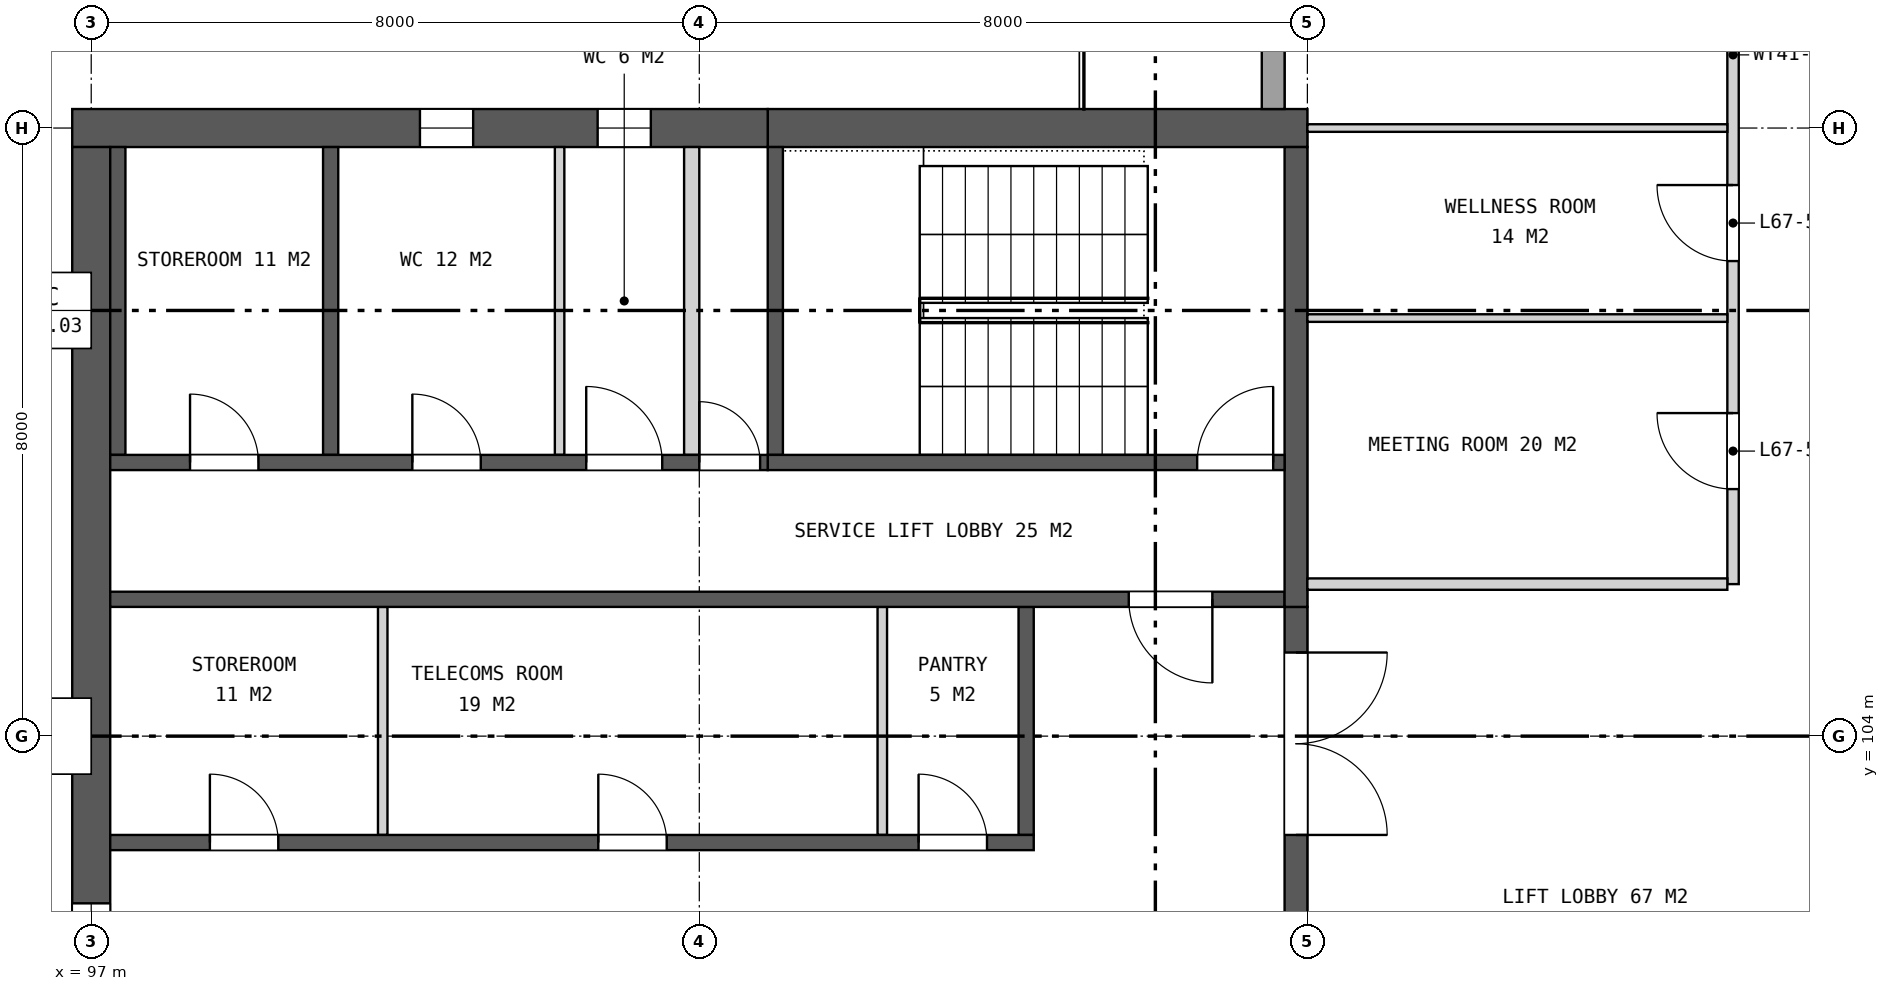
"""IFC4 building model, lengths in metres.
Left out: names, types, materials, properties, quantities, classifications, styles, units other than length and angle.
Written with IfcOpenShell. Run it as: python <this file> out.ifc"""

import sys

from ifc_helpers import new_model, si_unit, direction, frame, frame_2d, origin, place, context, subcontext, project, spatial, rectangle, extrude, element, fill, save


model = new_model("IFC4")
c1 = context("Model", 3, precision=1e-05, world=origin(), true_north=direction((0.0, 1.0)))
c2 = subcontext(c1, "Body", "Model", "MODEL_VIEW")
j1 = project(units=[si_unit("LENGTHUNIT", "METRE"), si_unit("PLANEANGLEUNIT", "RADIAN")], contexts=[c1])
p1 = place(None, origin())
s1 = spatial("IfcSite", under=j1, at=p1, CompositionType="ELEMENT")
p2 = place(p1, origin())
s2 = spatial("IfcBuilding", under=s1, at=p2, CompositionType="ELEMENT")
p3 = place(p2, frame((0.0, 0.0, 311.3)))
s3 = spatial("IfcBuildingStorey", under=s2, at=p3, CompositionType="ELEMENT", Elevation=311.3)
p4 = place(p3, frame((113.0, 112.0, 0.0), z_axis=(0.0, 0.0, 1.0), x_axis=(-1.0, 0.0, 0.0)))
e1 = element("IfcWall", 1, at=p4, inside=s3, PredefinedType="SHEAR", context=c2, shape_type="SweptSolid", body=[
    extrude(rectangle(XDim=7.1, YDim=0.5, at=frame_2d((3.55, 0.0))), origin(), (0.0, 0.0, 1.0), 4.2),
])
p5 = place(p3, frame((105.9, 112.0, 0.0), z_axis=(0.0, 0.0, 1.0), x_axis=(-1.0, 0.0, 0.0)))
e2 = element("IfcWall", 2, at=p5, inside=s3, PredefinedType="SHEAR", context=c2, shape_type="SweptSolid", body=[
    extrude(rectangle(XDim=9.15, YDim=0.5, at=frame_2d((4.575, 0.0))), origin(), (0.0, 0.0, 1.0), 4.2),
])
p6 = place(p5, frame((1.538, 0.0, 1.5)))
e3 = element("IfcOpeningElement", 3, at=p6, cuts=e2, PredefinedType="OPENING", context=c2, shape_type="SweptSolid", body=[
    extrude(rectangle(XDim=0.7, YDim=0.9, at=frame_2d((0.35, 0.45))), frame((0.0, 0.26, 0.0), z_axis=(0.0, -1.0, 0.0), x_axis=(1.0, 0.0, 0.0)), (0.0, 0.0, 1.0), 0.52),
])
p7 = place(p5, frame((3.875, 0.0, 1.5)))
e4 = element("IfcOpeningElement", 4, at=p7, cuts=e2, PredefinedType="OPENING", context=c2, shape_type="SweptSolid", body=[
    extrude(rectangle(XDim=0.7, YDim=0.9, at=frame_2d((0.35, 0.45))), frame((0.0, 0.26, 0.0), z_axis=(0.0, -1.0, 0.0), x_axis=(1.0, 0.0, 0.0)), (0.0, 0.0, 1.0), 0.52),
])
p8 = place(p3, frame((97.0, 111.75, 0.0), z_axis=(0.0, 0.0, 1.0), x_axis=(0.0, -1.0, 0.0)))
e5 = element("IfcWall", 5, at=p8, inside=s3, PredefinedType="SHEAR", context=c2, shape_type="SweptSolid", body=[
    extrude(rectangle(XDim=23.5, YDim=0.5, at=frame_2d((11.75, 0.0))), origin(), (0.0, 0.0, 1.0), 4.2),
])
p9 = place(p8, frame((9.95, 0.0, 0.15)))
e6 = element("IfcOpeningElement", 6, at=p9, cuts=e5, PredefinedType="OPENING", context=c2, shape_type="SweptSolid", body=[
    extrude(rectangle(XDim=3.6, YDim=3.0, at=frame_2d((1.8, 1.5))), frame((0.0, 0.26, 0.0), z_axis=(0.0, -1.0, 0.0), x_axis=(1.0, 0.0, 0.0)), (0.0, 0.0, 1.0), 0.52),
])
p10 = place(p3, frame((112.85, 105.7, 0.0), z_axis=(0.0, 0.0, 1.0), x_axis=(0.0, -1.0, 0.0)))
e7 = element("IfcWall", 7, at=p10, inside=s3, PredefinedType="SHEAR", context=c2, shape_type="SweptSolid", body=[
    extrude(rectangle(XDim=11.4, YDim=0.3, at=frame_2d((5.7, 0.0))), origin(), (0.0, 0.0, 1.0), 4.2),
])
p11 = place(p10, frame((0.6, 0.0, 0.0)))
e8 = element("IfcOpeningElement", 8, at=p11, cuts=e7, PredefinedType="OPENING", context=c2, shape_type="SweptSolid", body=[
    extrude(rectangle(XDim=2.4, YDim=2.4, at=frame_2d((1.2, 1.2))), frame((0.0, 0.16, 0.0), z_axis=(0.0, -1.0, 0.0), x_axis=(1.0, 0.0, 0.0)), (0.0, 0.0, 1.0), 0.32),
])
p12 = place(p10, frame((4.5, 0.0, 0.0)))
e9 = element("IfcOpeningElement", 9, at=p12, cuts=e7, PredefinedType="OPENING", context=c2, shape_type="SweptSolid", body=[
    extrude(rectangle(XDim=2.4, YDim=2.4, at=frame_2d((1.2, 1.2))), frame((0.0, 0.16, 0.0), z_axis=(0.0, -1.0, 0.0), x_axis=(1.0, 0.0, 0.0)), (0.0, 0.0, 1.0), 0.32),
])
p13 = place(p10, frame((8.4, 0.0, 0.0)))
e10 = element("IfcOpeningElement", 10, at=p13, cuts=e7, PredefinedType="OPENING", context=c2, shape_type="SweptSolid", body=[
    extrude(rectangle(XDim=2.4, YDim=2.4, at=frame_2d((1.2, 1.2))), frame((0.0, 0.16, 0.0), z_axis=(0.0, -1.0, 0.0), x_axis=(1.0, 0.0, 0.0)), (0.0, 0.0, 1.0), 0.32),
])
p14 = place(p3, frame((109.3, 105.7, 0.0), z_axis=(0.0, 0.0, 1.0), x_axis=(0.0, -1.0, 0.0)))
e11 = element("IfcWall", 11, at=p14, inside=s3, PredefinedType="SHEAR", context=c2, shape_type="SweptSolid", body=[
    extrude(rectangle(XDim=3.0, YDim=0.2, at=frame_2d((1.5, 0.0))), origin(), (0.0, 0.0, 1.0), 4.2),
])
for number, where, z_axis, x_axis in (
    (12, (107.407, 105.7, 0.0), (0.0, 0.0, 1.0), (0.0, -1.0, 0.0)),
    (13, (100.835, 105.7, 0.0), (0.0, 0.0, 1.0), (0.0, -1.0, 0.0)),
):
    element("IfcWall", number, at=place(p3, frame(where, z_axis=z_axis, x_axis=x_axis)), inside=s3, PredefinedType="PARTITIONING", context=c2, shape_type="SweptSolid", body=[
        extrude(rectangle(XDim=3.0, YDim=0.125, at=frame_2d((1.5, 0.0))), origin(), (0.0, 0.0, 1.0), 4.2),
    ])
p15 = place(p3, frame((109.4, 102.6, 0.0), z_axis=(0.0, 0.0, 1.0), x_axis=(-1.0, 0.0, 0.0)))
e14 = element("IfcWall", 14, at=p15, inside=s3, PredefinedType="SHEAR", context=c2, shape_type="SweptSolid", body=[
    extrude(rectangle(XDim=12.15, YDim=0.2, at=frame_2d((6.075, 0.0))), origin(), (0.0, 0.0, 1.0), 4.2),
])
p16 = place(p15, frame((0.615, 0.0, 0.0)))
e15 = element("IfcOpeningElement", 15, at=p16, cuts=e14, PredefinedType="OPENING", context=c2, shape_type="SweptSolid", body=[
    extrude(rectangle(XDim=0.9, YDim=2.1, at=frame_2d((0.45, 1.05))), frame((0.0, 0.11, 0.0), z_axis=(0.0, -1.0, 0.0), x_axis=(1.0, 0.0, 0.0)), (0.0, 0.0, 1.0), 0.22),
])
p17 = place(p15, frame((4.829, 0.0, 0.0)))
e16 = element("IfcOpeningElement", 16, at=p17, cuts=e14, PredefinedType="OPENING", context=c2, shape_type="SweptSolid", body=[
    extrude(rectangle(XDim=0.9, YDim=2.1, at=frame_2d((0.45, 1.05))), frame((0.0, 0.11, 0.0), z_axis=(0.0, -1.0, 0.0), x_axis=(1.0, 0.0, 0.0)), (0.0, 0.0, 1.0), 0.22),
])
p18 = place(p15, frame((9.939, 0.0, 0.0)))
e17 = element("IfcOpeningElement", 17, at=p18, cuts=e14, PredefinedType="OPENING", context=c2, shape_type="SweptSolid", body=[
    extrude(rectangle(XDim=0.9, YDim=2.1, at=frame_2d((0.45, 1.05))), frame((0.0, 0.11, 0.0), z_axis=(0.0, -1.0, 0.0), x_axis=(1.0, 0.0, 0.0)), (0.0, 0.0, 1.0), 0.22),
])
p19 = place(p3, frame((112.7, 105.8, 0.0), z_axis=(0.0, 0.0, 1.0), x_axis=(-1.0, 0.0, 0.0)))
e18 = element("IfcWall", 18, at=p19, inside=s3, PredefinedType="SHEAR", context=c2, shape_type="SweptSolid", body=[
    extrude(rectangle(XDim=15.45, YDim=0.2, at=frame_2d((7.725, 0.0))), origin(), (0.0, 0.0, 1.0), 4.2),
])
p20 = place(p19, frame((0.95, 0.0, 0.0)))
e19 = element("IfcOpeningElement", 19, at=p20, cuts=e18, PredefinedType="OPENING", context=c2, shape_type="SweptSolid", body=[
    extrude(rectangle(XDim=1.1, YDim=2.1, at=frame_2d((0.55, 1.05))), frame((0.0, 0.11, 0.0), z_axis=(0.0, -1.0, 0.0), x_axis=(1.0, 0.0, 0.0)), (0.0, 0.0, 1.0), 0.22),
])
p21 = place(p3, frame((112.85, 111.75, 0.0), z_axis=(0.0, 0.0, 1.0), x_axis=(0.0, -1.0, 0.0)))
e20 = element("IfcWall", 20, at=p21, inside=s3, PredefinedType="SHEAR", context=c2, shape_type="SweptSolid", body=[
    extrude(rectangle(XDim=6.05, YDim=0.3, at=frame_2d((3.025, 0.0))), origin(), (0.0, 0.0, 1.0), 4.2),
])
for number, where, z_axis, x_axis in (
    (21, (106.0, 111.75, 0.0), (0.0, 0.0, 1.0), (0.0, -1.0, 0.0)),
    (22, (100.15, 111.75, 0.0), (0.0, 0.0, 1.0), (0.0, -1.0, 0.0)),
    (23, (97.35, 111.75, 0.0), (0.0, 0.0, 1.0), (0.0, -1.0, 0.0)),
):
    element("IfcWall", number, at=place(p3, frame(where, z_axis=z_axis, x_axis=x_axis)), inside=s3, PredefinedType="SHEAR", context=c2, shape_type="SweptSolid", body=[
        extrude(rectangle(XDim=4.05, YDim=0.2, at=frame_2d((2.025, 0.0))), origin(), (0.0, 0.0, 1.0), 4.2),
    ])
p22 = place(p3, frame((104.9, 111.75, 0.0), z_axis=(0.0, 0.0, 1.0), x_axis=(0.0, -1.0, 0.0)))
e24 = element("IfcWall", 24, at=p22, inside=s3, PredefinedType="PARTITIONING", context=c2, shape_type="SweptSolid", body=[
    extrude(rectangle(XDim=4.05, YDim=0.2, at=frame_2d((2.025, 0.0))), origin(), (0.0, 0.0, 1.0), 4.2),
])
p23 = place(p3, frame((103.162, 111.75, 0.0), z_axis=(0.0, 0.0, 1.0), x_axis=(0.0, -1.0, 0.0)))
e25 = element("IfcWall", 25, at=p23, inside=s3, PredefinedType="PARTITIONING", context=c2, shape_type="SweptSolid", body=[
    extrude(rectangle(XDim=4.05, YDim=0.125, at=frame_2d((2.025, 0.0))), origin(), (0.0, 0.0, 1.0), 4.2),
])
p24 = place(p3, frame((112.7, 107.6, 0.0), z_axis=(0.0, 0.0, 1.0), x_axis=(-1.0, 0.0, 0.0)))
e26 = element("IfcWall", 26, at=p24, inside=s3, PredefinedType="SHEAR", context=c2, shape_type="SweptSolid", body=[
    extrude(rectangle(XDim=6.8, YDim=0.2, at=frame_2d((3.4, 0.0))), origin(), (0.0, 0.0, 1.0), 4.2),
])
p25 = place(p24, frame((0.15, 0.0, 0.0)))
e27 = element("IfcOpeningElement", 27, at=p25, cuts=e26, PredefinedType="OPENING", context=c2, shape_type="SweptSolid", body=[
    extrude(rectangle(XDim=1.0, YDim=2.1, at=frame_2d((0.5, 1.05))), frame((0.0, 0.11, 0.0), z_axis=(0.0, -1.0, 0.0), x_axis=(1.0, 0.0, 0.0)), (0.0, 0.0, 1.0), 0.22),
])
p26 = place(p3, frame((105.9, 107.6, 0.0), z_axis=(0.0, 0.0, 1.0), x_axis=(-1.0, 0.0, 0.0)))
e28 = element("IfcWall", 28, at=p26, inside=s3, PredefinedType="SHEAR", context=c2, shape_type="SweptSolid", body=[
    extrude(rectangle(XDim=8.65, YDim=0.2, at=frame_2d((4.325, 0.0))), origin(), (0.0, 0.0, 1.0), 4.2),
])
p27 = place(p26, frame((0.1, 0.0, 0.0)))
e29 = element("IfcOpeningElement", 29, at=p27, cuts=e28, PredefinedType="OPENING", context=c2, shape_type="SweptSolid", body=[
    extrude(rectangle(XDim=0.8, YDim=2.1, at=frame_2d((0.4, 1.05))), frame((0.0, 0.11, 0.0), z_axis=(0.0, -1.0, 0.0), x_axis=(1.0, 0.0, 0.0)), (0.0, 0.0, 1.0), 0.22),
])
p28 = place(p26, frame((1.388, 0.0, 0.0)))
e30 = element("IfcOpeningElement", 30, at=p28, cuts=e28, PredefinedType="OPENING", context=c2, shape_type="SweptSolid", body=[
    extrude(rectangle(XDim=1.0, YDim=2.1, at=frame_2d((0.5, 1.05))), frame((0.0, 0.11, 0.0), z_axis=(0.0, -1.0, 0.0), x_axis=(1.0, 0.0, 0.0)), (0.0, 0.0, 1.0), 0.22),
])
p29 = place(p26, frame((3.775, 0.0, 0.0)))
e31 = element("IfcOpeningElement", 31, at=p29, cuts=e28, PredefinedType="OPENING", context=c2, shape_type="SweptSolid", body=[
    extrude(rectangle(XDim=0.9, YDim=2.1, at=frame_2d((0.45, 1.05))), frame((0.0, 0.11, 0.0), z_axis=(0.0, -1.0, 0.0), x_axis=(1.0, 0.0, 0.0)), (0.0, 0.0, 1.0), 0.22),
])
p30 = place(p26, frame((6.7, 0.0, 0.0)))
e32 = element("IfcOpeningElement", 32, at=p30, cuts=e28, PredefinedType="OPENING", context=c2, shape_type="SweptSolid", body=[
    extrude(rectangle(XDim=0.9, YDim=2.1, at=frame_2d((0.45, 1.05))), frame((0.0, 0.11, 0.0), z_axis=(0.0, -1.0, 0.0), x_axis=(1.0, 0.0, 0.0)), (0.0, 0.0, 1.0), 0.22),
])
p31 = place(p3, frame((112.55, 119.965, 0.0), z_axis=(0.0, 0.0, 1.0), x_axis=(0.0, -1.0, 0.0)))
e33 = element("IfcWall", 33, at=p31, inside=s3, PredefinedType="SOLIDWALL", context=c2, shape_type="SweptSolid", body=[
    extrude(rectangle(XDim=7.715, YDim=0.3, at=frame_2d((3.857, 0.0))), origin(), (0.0, 0.0, 1.0), 3.544),
])
p32 = place(p31, frame((2.765, 0.0, 0.0)))
e34 = element("IfcOpeningElement", 34, at=p32, cuts=e33, PredefinedType="OPENING", context=c2, shape_type="SweptSolid", body=[
    extrude(rectangle(XDim=2.4, YDim=2.4, at=frame_2d((1.2, 1.2))), frame((0.0, 0.16, 0.0), z_axis=(0.0, -1.0, 0.0), x_axis=(1.0, 0.0, 0.0)), (0.0, 0.0, 1.0), 0.32),
])
p33 = place(p3, frame((118.6, 106.0, 0.0), z_axis=(0.0, 0.0, 1.0), x_axis=(0.0, 1.0, 0.0)))
e35 = element("IfcWall", 35, at=p33, inside=s3, PredefinedType="PARTITIONING", context=c2, shape_type="SweptSolid", body=[
    extrude(rectangle(XDim=13.925, YDim=0.15, at=frame_2d((6.962, 0.0))), origin(), (0.0, 0.0, 1.0), 3.443),
])
p34 = place(p33, frame((1.25, 0.0, 0.0)))
e36 = element("IfcOpeningElement", 36, at=p34, cuts=e35, PredefinedType="OPENING", context=c2, shape_type="SweptSolid", body=[
    extrude(rectangle(XDim=1.0, YDim=2.1, at=frame_2d((0.5, 1.05))), frame((0.0, 0.085, 0.0), z_axis=(0.0, -1.0, 0.0), x_axis=(1.0, 0.0, 0.0)), (0.0, 0.0, 1.0), 0.17),
])
p35 = place(p33, frame((4.25, 0.0, 0.0)))
e37 = element("IfcOpeningElement", 37, at=p35, cuts=e35, PredefinedType="OPENING", context=c2, shape_type="SweptSolid", body=[
    extrude(rectangle(XDim=1.0, YDim=2.1, at=frame_2d((0.5, 1.05))), frame((0.0, 0.085, 0.0), z_axis=(0.0, -1.0, 0.0), x_axis=(1.0, 0.0, 0.0)), (0.0, 0.0, 1.0), 0.17),
])
p36 = place(p33, frame((9.45, 0.0, 0.0)))
e38 = element("IfcOpeningElement", 38, at=p36, cuts=e35, PredefinedType="OPENING", context=c2, shape_type="SweptSolid", body=[
    extrude(rectangle(XDim=1.0, YDim=2.1, at=frame_2d((0.5, 1.05))), frame((0.0, 0.085, 0.0), z_axis=(0.0, -1.0, 0.0), x_axis=(1.0, 0.0, 0.0)), (0.0, 0.0, 1.0), 0.17),
])
p37 = place(p3, frame((113.0, 106.0, 0.0), z_axis=(0.0, 0.0, 1.0), x_axis=(1.0, 0.0, 0.0)))
e39 = element("IfcWall", 39, at=p37, inside=s3, PredefinedType="PARTITIONING", context=c2, shape_type="SweptSolid", body=[
    extrude(rectangle(XDim=5.525, YDim=0.15, at=frame_2d((2.762, 0.0))), origin(), (0.0, 0.0, 1.0), 3.443),
])
for number, where, z_axis, x_axis in (
    (40, (113.0, 109.5, 0.0), (0.0, 0.0, 1.0), (1.0, 0.0, 0.0)),
    (41, (113.0, 112.0, 0.0), (0.0, 0.0, 1.0), (1.0, 0.0, 0.0)),
):
    element("IfcWall", number, at=place(p3, frame(where, z_axis=z_axis, x_axis=x_axis)), inside=s3, PredefinedType="PARTITIONING", context=c2, shape_type="SweptSolid", body=[
        extrude(rectangle(XDim=5.525, YDim=0.1, at=frame_2d((2.762, 0.0))), origin(), (0.0, 0.0, 1.0), 3.443),
    ])
p38 = place(p6, origin())
e42 = element("IfcWindow", 42, at=p38, inside=s3, PartitioningType="SINGLE_PANEL", PredefinedType="WINDOW", context=c2, shape_type="SweptSolid", body=[
    extrude(rectangle(XDim=0.7, YDim=0.9, at=frame_2d((0.35, 0.45))), frame((0.0, 0.03, 0.0), z_axis=(0.0, -1.0, 0.0), x_axis=(1.0, 0.0, 0.0)), (0.0, 0.0, 1.0), 0.06),
])
fill(e3, e42)
p39 = place(p7, origin())
e43 = element("IfcWindow", 43, at=p39, inside=s3, PartitioningType="SINGLE_PANEL", PredefinedType="WINDOW", context=c2, shape_type="SweptSolid", body=[
    extrude(rectangle(XDim=0.7, YDim=0.9, at=frame_2d((0.35, 0.45))), frame((0.0, 0.03, 0.0), z_axis=(0.0, -1.0, 0.0), x_axis=(1.0, 0.0, 0.0)), (0.0, 0.0, 1.0), 0.06),
])
fill(e4, e43)
p40 = place(p9, origin())
e44 = element("IfcWindow", 44, at=p40, inside=s3, PartitioningType="SINGLE_PANEL", PredefinedType="WINDOW", context=c2, shape_type="SweptSolid", body=[
    extrude(rectangle(XDim=3.6, YDim=3.0, at=frame_2d((1.8, 1.5))), frame((0.0, 0.03, 0.0), z_axis=(0.0, -1.0, 0.0), x_axis=(1.0, 0.0, 0.0)), (0.0, 0.0, 1.0), 0.06),
])
fill(e6, e44)
p41 = place(p11, origin())
e45 = element("IfcDoor", 45, at=p41, inside=s3, OperationType="DOUBLE_DOOR_SINGLE_SWING", PredefinedType="DOOR", context=c2, shape_type="SweptSolid", body=[
    extrude(rectangle(XDim=2.4, YDim=2.4, at=frame_2d((1.2, 1.2))), frame((0.0, 0.025, 0.0), z_axis=(0.0, -1.0, 0.0), x_axis=(1.0, 0.0, 0.0)), (0.0, 0.0, 1.0), 0.05),
])
fill(e8, e45)
p42 = place(p16, frame((0.9, 0.0, 0.0), z_axis=(0.0, 0.0, 1.0), x_axis=(-1.0, 0.0, 0.0)))
e46 = element("IfcDoor", 46, at=p42, inside=s3, OperationType="SINGLE_SWING_LEFT", PredefinedType="DOOR", context=c2, shape_type="SweptSolid", body=[
    extrude(rectangle(XDim=0.9, YDim=2.1, at=frame_2d((0.45, 1.05))), frame((0.0, 0.025, 0.0), z_axis=(0.0, -1.0, 0.0), x_axis=(1.0, 0.0, 0.0)), (0.0, 0.0, 1.0), 0.05),
])
fill(e15, e46)
p43 = place(p17, frame((0.9, 0.0, 0.0), z_axis=(0.0, 0.0, 1.0), x_axis=(-1.0, 0.0, 0.0)))
e47 = element("IfcDoor", 47, at=p43, inside=s3, OperationType="SINGLE_SWING_LEFT", PredefinedType="DOOR", context=c2, shape_type="SweptSolid", body=[
    extrude(rectangle(XDim=0.9, YDim=2.1, at=frame_2d((0.45, 1.05))), frame((0.0, 0.025, 0.0), z_axis=(0.0, -1.0, 0.0), x_axis=(1.0, 0.0, 0.0)), (0.0, 0.0, 1.0), 0.05),
])
fill(e16, e47)
p44 = place(p18, frame((0.9, 0.0, 0.0), z_axis=(0.0, 0.0, 1.0), x_axis=(-1.0, 0.0, 0.0)))
e48 = element("IfcDoor", 48, at=p44, inside=s3, OperationType="SINGLE_SWING_LEFT", PredefinedType="DOOR", context=c2, shape_type="SweptSolid", body=[
    extrude(rectangle(XDim=0.9, YDim=2.1, at=frame_2d((0.45, 1.05))), frame((0.0, 0.025, 0.0), z_axis=(0.0, -1.0, 0.0), x_axis=(1.0, 0.0, 0.0)), (0.0, 0.0, 1.0), 0.05),
])
fill(e17, e48)
p45 = place(p20, origin())
e49 = element("IfcDoor", 49, at=p45, inside=s3, OperationType="SINGLE_SWING_LEFT", PredefinedType="DOOR", context=c2, shape_type="SweptSolid", body=[
    extrude(rectangle(XDim=1.1, YDim=2.1, at=frame_2d((0.55, 1.05))), frame((0.0, 0.025, 0.0), z_axis=(0.0, -1.0, 0.0), x_axis=(1.0, 0.0, 0.0)), (0.0, 0.0, 1.0), 0.05),
])
fill(e19, e49)
p46 = place(p25, frame((1.0, 0.0, 0.0), z_axis=(0.0, 0.0, 1.0), x_axis=(-1.0, 0.0, 0.0)))
e50 = element("IfcDoor", 50, at=p46, inside=s3, OperationType="SINGLE_SWING_RIGHT", PredefinedType="DOOR", context=c2, shape_type="SweptSolid", body=[
    extrude(rectangle(XDim=1.0, YDim=2.1, at=frame_2d((0.5, 1.05))), frame((0.0, 0.025, 0.0), z_axis=(0.0, -1.0, 0.0), x_axis=(1.0, 0.0, 0.0)), (0.0, 0.0, 1.0), 0.05),
])
fill(e27, e50)
p47 = place(p27, frame((0.8, 0.0, 0.0), z_axis=(0.0, 0.0, 1.0), x_axis=(-1.0, 0.0, 0.0)))
e51 = element("IfcDoor", 51, at=p47, inside=s3, OperationType="SINGLE_SWING_LEFT", PredefinedType="DOOR", context=c2, shape_type="SweptSolid", body=[
    extrude(rectangle(XDim=0.8, YDim=2.1, at=frame_2d((0.4, 1.05))), frame((0.0, 0.025, 0.0), z_axis=(0.0, -1.0, 0.0), x_axis=(1.0, 0.0, 0.0)), (0.0, 0.0, 1.0), 0.05),
])
fill(e29, e51)
p48 = place(p28, frame((1.0, 0.0, 0.0), z_axis=(0.0, 0.0, 1.0), x_axis=(-1.0, 0.0, 0.0)))
e52 = element("IfcDoor", 52, at=p48, inside=s3, OperationType="SINGLE_SWING_LEFT", PredefinedType="DOOR", context=c2, shape_type="SweptSolid", body=[
    extrude(rectangle(XDim=1.0, YDim=2.1, at=frame_2d((0.5, 1.05))), frame((0.0, 0.025, 0.0), z_axis=(0.0, -1.0, 0.0), x_axis=(1.0, 0.0, 0.0)), (0.0, 0.0, 1.0), 0.05),
])
fill(e30, e52)
p49 = place(p29, frame((0.9, 0.0, 0.0), z_axis=(0.0, 0.0, 1.0), x_axis=(-1.0, 0.0, 0.0)))
e53 = element("IfcDoor", 53, at=p49, inside=s3, OperationType="SINGLE_SWING_LEFT", PredefinedType="DOOR", context=c2, shape_type="SweptSolid", body=[
    extrude(rectangle(XDim=0.9, YDim=2.1, at=frame_2d((0.45, 1.05))), frame((0.0, 0.025, 0.0), z_axis=(0.0, -1.0, 0.0), x_axis=(1.0, 0.0, 0.0)), (0.0, 0.0, 1.0), 0.05),
])
fill(e31, e53)
p50 = place(p30, frame((0.9, 0.0, 0.0), z_axis=(0.0, 0.0, 1.0), x_axis=(-1.0, 0.0, 0.0)))
e54 = element("IfcDoor", 54, at=p50, inside=s3, OperationType="SINGLE_SWING_LEFT", PredefinedType="DOOR", context=c2, shape_type="SweptSolid", body=[
    extrude(rectangle(XDim=0.9, YDim=2.1, at=frame_2d((0.45, 1.05))), frame((0.0, 0.025, 0.0), z_axis=(0.0, -1.0, 0.0), x_axis=(1.0, 0.0, 0.0)), (0.0, 0.0, 1.0), 0.05),
])
fill(e32, e54)
p51 = place(p34, origin())
e55 = element("IfcDoor", 55, at=p51, inside=s3, OperationType="SINGLE_SWING_RIGHT", PredefinedType="DOOR", context=c2, shape_type="SweptSolid", body=[
    extrude(rectangle(XDim=1.0, YDim=2.1, at=frame_2d((0.5, 1.05))), frame((0.0, 0.025, 0.0), z_axis=(0.0, -1.0, 0.0), x_axis=(1.0, 0.0, 0.0)), (0.0, 0.0, 1.0), 0.05),
])
fill(e36, e55)
p52 = place(p35, origin())
e56 = element("IfcDoor", 56, at=p52, inside=s3, OperationType="SINGLE_SWING_RIGHT", PredefinedType="DOOR", context=c2, shape_type="SweptSolid", body=[
    extrude(rectangle(XDim=1.0, YDim=2.1, at=frame_2d((0.5, 1.05))), frame((0.0, 0.025, 0.0), z_axis=(0.0, -1.0, 0.0), x_axis=(1.0, 0.0, 0.0)), (0.0, 0.0, 1.0), 0.05),
])
fill(e37, e56)
save(model, sys.argv[1])
